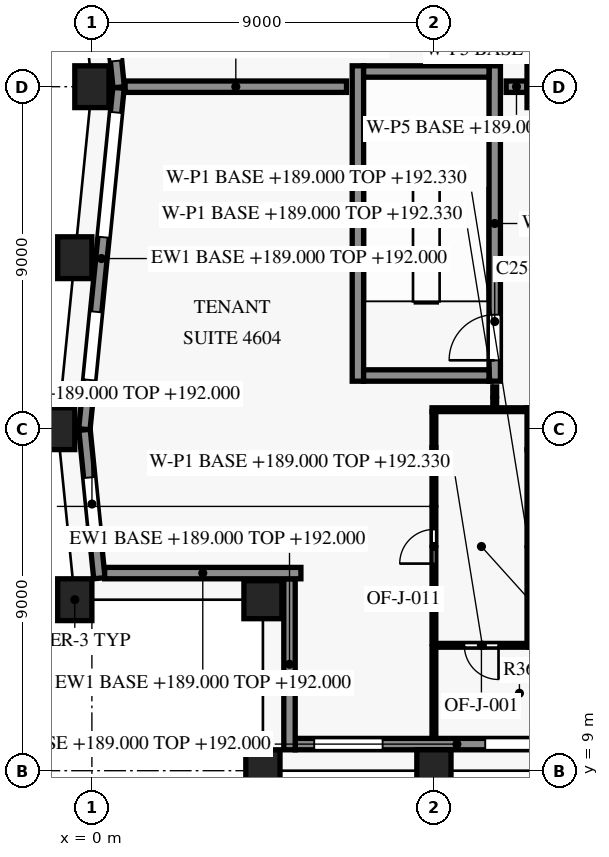
"""IFC4 building model, lengths in metres.
Left out: names, types, materials, properties, quantities, classifications, styles, units other than length and angle.
Written with IfcOpenShell. Run it as: python <this file> out.ifc"""

import sys

from ifc_helpers import new_model, si_unit, direction, frame, frame_2d, origin, origin_2d, place, context, subcontext, project, spatial, rectangle, extrude, element, fill, save


model = new_model("IFC4")
c1 = context("Model", 3, precision=1e-05, world=origin(), true_north=direction((0.0, 1.0)))
c2 = subcontext(c1, "Body", "Model", "MODEL_VIEW")
j1 = project(units=[si_unit("LENGTHUNIT", "METRE"), si_unit("PLANEANGLEUNIT", "RADIAN")], contexts=[c1])
p1 = place(None, origin())
s1 = spatial("IfcSite", under=j1, at=p1, CompositionType="ELEMENT")
p2 = place(p1, origin())
s2 = spatial("IfcBuilding", under=s1, at=p2, CompositionType="ELEMENT")
p3 = place(p2, frame((0.0, 0.0, 189.0)))
s3 = spatial("IfcBuildingStorey", under=s2, at=p3, CompositionType="ELEMENT", Elevation=189.0)
for number, where, z_axis, x_axis in (
    (1, (4.5, 9.0, 0.0), (0.0, 0.0, 1.0), (1.0, 0.0, 0.0)),
    (2, (9.0, 9.0, 0.0), (0.0, 0.0, 1.0), (1.0, 0.0, 0.0)),
    (3, (0.0, 27.0, 0.0), (0.0, 0.0, 1.0), (0.0, -1.0, 0.0)),
    (4, (-0.45, 22.5, 0.0), (0.0, 0.0, 1.0), (-0.1, -0.995, 0.0)),
    (5, (-0.9, 18.0, 0.0), (0.0, 0.0, 1.0), (0.0, -1.0, 0.0)),
    (6, (-0.45, 13.5, 0.0), (0.0, 0.0, 1.0), (0.1, -0.995, 0.0)),
):
    element("IfcColumn", number, at=place(p3, frame(where, z_axis=z_axis, x_axis=x_axis)), inside=s3, PredefinedType="COLUMN", context=c2, shape_type="SweptSolid", body=[
        extrude(rectangle(XDim=0.9, YDim=1.1, at=origin_2d()), origin(), (0.0, 0.0, 1.0), 3.8),
    ])
p4 = place(p3, frame((4.5, 13.5, 0.0), z_axis=(0.0, 0.0, 1.0), x_axis=(1.0, 0.0, 0.0)))
e7 = element("IfcColumn", 7, at=p4, inside=s3, PredefinedType="COLUMN", context=c2, shape_type="SweptSolid", body=[
    extrude(rectangle(XDim=1.0, YDim=1.0, at=origin_2d()), origin(), (0.0, 0.0, 1.0), 3.8),
])
for number, where, z_axis, x_axis in (
    (8, (12.0, 18.0, 0.0), (0.0, 0.0, 1.0), (1.0, 0.0, 0.0)),
    (9, (12.0, 27.0, 0.0), (0.0, 0.0, 1.0), (1.0, 0.0, 0.0)),
):
    element("IfcColumn", number, at=place(p3, frame(where, z_axis=z_axis, x_axis=x_axis)), inside=s3, PredefinedType="COLUMN", context=c2, shape_type="SweptSolid", body=[
        extrude(rectangle(XDim=1.1, YDim=1.1, at=origin_2d()), origin(), (0.0, 0.0, 1.0), 3.8),
    ])
p5 = place(p3, frame((13.86, 9.7, 0.0), z_axis=(0.0, 0.0, 1.0), x_axis=(-1.0, 0.0, 0.0)))
e10 = element("IfcWall", 10, at=p5, inside=s3, PredefinedType="SOLIDWALL", context=c2, shape_type="SweptSolid", body=[
    extrude(rectangle(XDim=8.51, YDim=0.3, at=frame_2d((4.255, 0.0))), origin(), (0.0, 0.0, 1.0), 3.0),
])
p6 = place(p5, frame((1.71, 0.0, 0.75)))
e11 = element("IfcOpeningElement", 11, at=p6, cuts=e10, PredefinedType="OPENING", context=c2, shape_type="SweptSolid", body=[
    extrude(rectangle(XDim=1.8, YDim=1.8, at=frame_2d((0.9, 0.9))), frame((0.0, 0.16, 0.0), z_axis=(0.0, -1.0, 0.0), x_axis=(1.0, 0.0, 0.0)), (0.0, 0.0, 1.0), 0.32),
])
p7 = place(p5, frame((6.21, 0.0, 0.75)))
e12 = element("IfcOpeningElement", 12, at=p7, cuts=e10, PredefinedType="OPENING", context=c2, shape_type="SweptSolid", body=[
    extrude(rectangle(XDim=1.8, YDim=1.8, at=frame_2d((0.9, 0.9))), frame((0.0, 0.16, 0.0), z_axis=(0.0, -1.0, 0.0), x_axis=(1.0, 0.0, 0.0)), (0.0, 0.0, 1.0), 0.32),
])
p8 = place(p3, frame((0.705, 26.985, 0.0), z_axis=(0.0, 0.0, 1.0), x_axis=(-0.099533329093, 0.995034228758, 0.0)))
e13 = element("IfcWall", 13, at=p8, inside=s3, PredefinedType="SOLIDWALL", context=c2, shape_type="SweptSolid", body=[
    extrude(rectangle(XDim=8.98, YDim=0.3, at=frame_2d((4.49, 0.0))), origin(), (0.0, 0.0, 1.0), 3.0),
])
p9 = place(p8, frame((0.696, 0.0, 0.15)))
e14 = element("IfcOpeningElement", 14, at=p9, cuts=e13, PredefinedType="OPENING", context=c2, shape_type="SweptSolid", body=[
    extrude(rectangle(XDim=3.3, YDim=2.4, at=frame_2d((1.65, 1.2))), frame((0.0, 0.16, 0.0), z_axis=(0.0, -1.0, 0.0), x_axis=(1.0, 0.0, 0.0)), (0.0, 0.0, 1.0), 0.32),
])
p10 = place(p8, frame((5.969, 0.0, 0.75)))
e15 = element("IfcOpeningElement", 15, at=p10, cuts=e13, PredefinedType="OPENING", context=c2, shape_type="SweptSolid", body=[
    extrude(rectangle(XDim=1.8, YDim=1.8, at=frame_2d((0.9, 0.9))), frame((0.0, 0.16, 0.0), z_axis=(0.0, -1.0, 0.0), x_axis=(1.0, 0.0, 0.0)), (0.0, 0.0, 1.0), 0.32),
])
p11 = place(p3, frame((-0.198, 17.985, 0.0), z_axis=(0.0, 0.0, 1.0), x_axis=(0.099495688264, 0.995037993253, 0.0)))
e16 = element("IfcWall", 16, at=p11, inside=s3, PredefinedType="SOLIDWALL", context=c2, shape_type="SweptSolid", body=[
    extrude(rectangle(XDim=9.03, YDim=0.3, at=frame_2d((4.515, 0.0))), origin(), (0.0, 0.0, 1.0), 3.0),
])
p12 = place(p11, frame((1.306, 0.0, 0.75)))
e17 = element("IfcOpeningElement", 17, at=p12, cuts=e16, PredefinedType="OPENING", context=c2, shape_type="SweptSolid", body=[
    extrude(rectangle(XDim=1.8, YDim=1.8, at=frame_2d((0.9, 0.9))), frame((0.0, 0.16, 0.0), z_axis=(0.0, -1.0, 0.0), x_axis=(1.0, 0.0, 0.0)), (0.0, 0.0, 1.0), 0.32),
])
p13 = place(p11, frame((5.079, 0.0, 0.15)))
e18 = element("IfcOpeningElement", 18, at=p13, cuts=e16, PredefinedType="OPENING", context=c2, shape_type="SweptSolid", body=[
    extrude(rectangle(XDim=3.3, YDim=2.4, at=frame_2d((1.65, 1.2))), frame((0.0, 0.16, 0.0), z_axis=(0.0, -1.0, 0.0), x_axis=(1.0, 0.0, 0.0)), (0.0, 0.0, 1.0), 0.32),
])
p14 = place(p3, frame((0.197, 14.065, 0.0), z_axis=(0.0, 0.0, 1.0), x_axis=(-0.099528354722, 0.995034726332, 0.0)))
e19 = element("IfcWall", 19, at=p14, inside=s3, PredefinedType="SOLIDWALL", context=c2, shape_type="SweptSolid", body=[
    extrude(rectangle(XDim=3.925, YDim=0.3, at=frame_2d((1.962, 0.0))), origin(), (0.0, 0.0, 1.0), 3.0),
])
p15 = place(p14, frame((0.864, 0.0, 0.75)))
e20 = element("IfcOpeningElement", 20, at=p15, cuts=e19, PredefinedType="OPENING", context=c2, shape_type="SweptSolid", body=[
    extrude(rectangle(XDim=1.8, YDim=1.8, at=frame_2d((0.9, 0.9))), frame((0.0, 0.16, 0.0), z_axis=(0.0, -1.0, 0.0), x_axis=(1.0, 0.0, 0.0)), (0.0, 0.0, 1.0), 0.32),
])
p16 = place(p3, frame((5.5, 14.2, 0.0), z_axis=(0.0, 0.0, 1.0), x_axis=(-1.0, 0.0, 0.0)))
e21 = element("IfcWall", 21, at=p16, inside=s3, PredefinedType="SOLIDWALL", context=c2, shape_type="SweptSolid", body=[
    extrude(rectangle(XDim=5.165, YDim=0.3, at=frame_2d((2.582, 0.0))), origin(), (0.0, 0.0, 1.0), 3.0),
])
p17 = place(p3, frame((5.2, 9.55, 0.0), z_axis=(0.0, 0.0, 1.0), x_axis=(0.0, 1.0, 0.0)))
e22 = element("IfcWall", 22, at=p17, inside=s3, PredefinedType="SOLIDWALL", context=c2, shape_type="SweptSolid", body=[
    extrude(rectangle(XDim=4.502, YDim=0.3, at=frame_2d((2.251, 0.0))), origin(), (0.0, 0.0, 1.0), 3.0),
])
for number, where, z_axis, x_axis in (
    (23, (7.15, 19.4, 0.0), (0.0, 0.0, 1.0), (1.0, 0.0, 0.0)),
    (24, (7.15, 27.4, 0.0), (0.0, 0.0, 1.0), (1.0, 0.0, 0.0)),
):
    element("IfcWall", number, at=place(p3, frame(where, z_axis=z_axis, x_axis=x_axis)), inside=s3, PredefinedType="SHEAR", context=c2, shape_type="SweptSolid", body=[
        extrude(rectangle(XDim=3.3, YDim=0.3, at=frame_2d((1.65, 0.0))), origin(), (0.0, 0.0, 1.0), 3.5),
    ])
p18 = place(p3, frame((7.0, 19.25, 0.0), z_axis=(0.0, 0.0, 1.0), x_axis=(0.0, 1.0, 0.0)))
e25 = element("IfcWall", 25, at=p18, inside=s3, PredefinedType="SHEAR", context=c2, shape_type="SweptSolid", body=[
    extrude(rectangle(XDim=8.3, YDim=0.3, at=frame_2d((4.15, 0.0))), origin(), (0.0, 0.0, 1.0), 3.5),
])
p19 = place(p3, frame((10.6, 19.25, 0.0), z_axis=(0.0, 0.0, 1.0), x_axis=(0.0, 1.0, 0.0)))
e26 = element("IfcWall", 26, at=p19, inside=s3, PredefinedType="SHEAR", context=c2, shape_type="SweptSolid", body=[
    extrude(rectangle(XDim=8.3, YDim=0.3, at=frame_2d((4.15, 0.0))), origin(), (0.0, 0.0, 1.0), 3.5),
])
p20 = place(p19, frame((0.55, 0.0, 0.0)))
e27 = element("IfcOpeningElement", 27, at=p20, cuts=e26, PredefinedType="OPENING", context=c2, shape_type="SweptSolid", body=[
    extrude(rectangle(XDim=1.2, YDim=2.2, at=frame_2d((0.6, 1.1))), frame((0.0, 0.16, 0.0), z_axis=(0.0, -1.0, 0.0), x_axis=(1.0, 0.0, 0.0)), (0.0, 0.0, 1.0), 0.32),
])
p21 = place(p3, frame((9.0, 9.87, 0.0), z_axis=(0.0, 0.0, 1.0), x_axis=(0.0, 1.0, 0.0)))
e28 = element("IfcWall", 28, at=p21, inside=s3, PredefinedType="PARTITIONING", context=c2, shape_type="SweptSolid", body=[
    extrude(rectangle(XDim=2.38, YDim=0.1, at=frame_2d((1.19, 0.0))), origin(), (0.0, 0.0, 1.0), 3.33),
])
p22 = place(p3, frame((11.5, 12.3, 0.0), z_axis=(0.0, 0.0, 1.0), x_axis=(-1.0, 0.0, 0.0)))
e29 = element("IfcWall", 29, at=p22, inside=s3, PredefinedType="PARTITIONING", context=c2, shape_type="SweptSolid", body=[
    extrude(rectangle(XDim=2.45, YDim=0.1, at=frame_2d((1.225, 0.0))), origin(), (0.0, 0.0, 1.0), 3.33),
])
p23 = place(p22, frame((0.8, 0.0, 0.0)))
e30 = element("IfcOpeningElement", 30, at=p23, cuts=e29, PredefinedType="OPENING", context=c2, shape_type="SweptSolid", body=[
    extrude(rectangle(XDim=0.9, YDim=2.1, at=frame_2d((0.45, 1.05))), frame((0.0, 0.06, 0.0), z_axis=(0.0, -1.0, 0.0), x_axis=(1.0, 0.0, 0.0)), (0.0, 0.0, 1.0), 0.12),
])
p24 = place(p3, frame((11.5, 12.3, 0.0), z_axis=(0.0, 0.0, 1.0), x_axis=(1.0, 0.0, 0.0)))
e31 = element("IfcWall", 31, at=p24, inside=s3, PredefinedType="PARTITIONING", context=c2, shape_type="SweptSolid", body=[
    extrude(rectangle(XDim=2.05, YDim=0.1, at=frame_2d((1.025, 0.0))), origin(), (0.0, 0.0, 1.0), 2.63),
])
p25 = place(p3, frame((9.0, 12.35, 0.0), z_axis=(0.0, 0.0, 1.0), x_axis=(0.0, 1.0, 0.0)))
e32 = element("IfcWall", 32, at=p25, inside=s3, PredefinedType="PARTITIONING", context=c2, shape_type="SweptSolid", body=[
    extrude(rectangle(XDim=5.15, YDim=0.1, at=frame_2d((2.575, 0.0))), origin(), (0.0, 0.0, 1.0), 3.33),
])
p26 = place(p25, frame((2.1, 0.0, 0.0)))
e33 = element("IfcOpeningElement", 33, at=p26, cuts=e32, PredefinedType="OPENING", context=c2, shape_type="SweptSolid", body=[
    extrude(rectangle(XDim=0.9, YDim=2.1, at=frame_2d((0.45, 1.05))), frame((0.0, 0.06, 0.0), z_axis=(0.0, -1.0, 0.0), x_axis=(1.0, 0.0, 0.0)), (0.0, 0.0, 1.0), 0.12),
])
p27 = place(p3, frame((11.5, 17.445, 0.0), z_axis=(0.0, 0.0, 1.0), x_axis=(0.0, -1.0, 0.0)))
e34 = element("IfcWall", 34, at=p27, inside=s3, PredefinedType="PARTITIONING", context=c2, shape_type="SweptSolid", body=[
    extrude(rectangle(XDim=5.095, YDim=0.1, at=frame_2d((2.547, 0.0))), origin(), (0.0, 0.0, 1.0), 3.33),
])
p28 = place(p3, frame((9.0, 17.5, 0.0), z_axis=(0.0, 0.0, 1.0), x_axis=(0.0, 1.0, 0.0)))
e35 = element("IfcWall", 35, at=p28, inside=s3, PredefinedType="PARTITIONING", context=c2, shape_type="SweptSolid", body=[
    extrude(rectangle(XDim=0.95, YDim=0.1, at=frame_2d((0.475, 0.0))), origin(), (0.0, 0.0, 1.0), 2.78),
])
p29 = place(p3, frame((8.95, 18.5, 0.0), z_axis=(0.0, 0.0, 1.0), x_axis=(1.0, 0.0, 0.0)))
e36 = element("IfcWall", 36, at=p29, inside=s3, PredefinedType="PARTITIONING", context=c2, shape_type="SweptSolid", body=[
    extrude(rectangle(XDim=2.48, YDim=0.1, at=frame_2d((1.24, 0.0))), origin(), (0.0, 0.0, 1.0), 3.33),
])
p30 = place(p3, frame((10.6, 18.55, 0.0), z_axis=(0.0, 0.0, 1.0), x_axis=(0.0, 1.0, 0.0)))
e37 = element("IfcWall", 37, at=p30, inside=s3, PredefinedType="PARTITIONING", context=c2, shape_type="SweptSolid", body=[
    extrude(rectangle(XDim=0.55, YDim=0.1, at=frame_2d((0.275, 0.0))), origin(), (0.0, 0.0, 1.0), 3.33),
])
p31 = place(p3, frame((0.874, 27.0, 0.0), z_axis=(0.0, 0.0, 1.0), x_axis=(1.0, 0.0, 0.0)))
e38 = element("IfcWall", 38, at=p31, inside=s3, PredefinedType="PARTITIONING", context=c2, shape_type="SweptSolid", body=[
    extrude(rectangle(XDim=5.826, YDim=0.3, at=frame_2d((2.913, 0.0))), origin(), (0.0, 0.0, 1.0), 2.63),
])
p32 = place(p3, frame((10.9, 27.0, 0.0), z_axis=(0.0, 0.0, 1.0), x_axis=(1.0, 0.0, 0.0)))
e39 = element("IfcWall", 39, at=p32, inside=s3, PredefinedType="PARTITIONING", context=c2, shape_type="SweptSolid", body=[
    extrude(rectangle(XDim=0.545, YDim=0.3, at=frame_2d((0.272, 0.0))), origin(), (0.0, 0.0, 1.0), 3.33),
])
p33 = place(p3, frame((10.748, 33.45, 0.0), z_axis=(0.0, 0.0, 1.0), x_axis=(0.0, -1.0, 0.0)))
e40 = element("IfcWall", 40, at=p33, inside=s3, PredefinedType="PARTITIONING", context=c2, shape_type="SweptSolid", body=[
    extrude(rectangle(XDim=5.75, YDim=0.1, at=frame_2d((2.875, 0.0))), origin(), (0.0, 0.0, 1.0), 3.33),
])
p34 = place(p6, origin())
e41 = element("IfcWindow", 41, at=p34, inside=s3, PartitioningType="SINGLE_PANEL", PredefinedType="WINDOW", context=c2, shape_type="SweptSolid", body=[
    extrude(rectangle(XDim=1.8, YDim=1.8, at=frame_2d((0.9, 0.9))), frame((0.0, 0.03, 0.0), z_axis=(0.0, -1.0, 0.0), x_axis=(1.0, 0.0, 0.0)), (0.0, 0.0, 1.0), 0.06),
])
fill(e11, e41)
p35 = place(p7, origin())
e42 = element("IfcWindow", 42, at=p35, inside=s3, PartitioningType="SINGLE_PANEL", PredefinedType="WINDOW", context=c2, shape_type="SweptSolid", body=[
    extrude(rectangle(XDim=1.8, YDim=1.8, at=frame_2d((0.9, 0.9))), frame((0.0, 0.03, 0.0), z_axis=(0.0, -1.0, 0.0), x_axis=(1.0, 0.0, 0.0)), (0.0, 0.0, 1.0), 0.06),
])
fill(e12, e42)
p36 = place(p9, origin())
e43 = element("IfcWindow", 43, at=p36, inside=s3, PartitioningType="SINGLE_PANEL", PredefinedType="WINDOW", context=c2, shape_type="SweptSolid", body=[
    extrude(rectangle(XDim=3.3, YDim=2.4, at=frame_2d((1.65, 1.2))), frame((0.0, 0.03, 0.0), z_axis=(0.0, -1.0, 0.0), x_axis=(1.0, 0.0, 0.0)), (0.0, 0.0, 1.0), 0.06),
])
fill(e14, e43)
p37 = place(p12, origin())
e44 = element("IfcWindow", 44, at=p37, inside=s3, PartitioningType="SINGLE_PANEL", PredefinedType="WINDOW", context=c2, shape_type="SweptSolid", body=[
    extrude(rectangle(XDim=1.8, YDim=1.8, at=frame_2d((0.9, 0.9))), frame((0.0, 0.03, 0.0), z_axis=(0.0, -1.0, 0.0), x_axis=(1.0, 0.0, 0.0)), (0.0, 0.0, 1.0), 0.06),
])
fill(e17, e44)
p38 = place(p13, origin())
e45 = element("IfcWindow", 45, at=p38, inside=s3, PartitioningType="SINGLE_PANEL", PredefinedType="WINDOW", context=c2, shape_type="SweptSolid", body=[
    extrude(rectangle(XDim=3.3, YDim=2.4, at=frame_2d((1.65, 1.2))), frame((0.0, 0.03, 0.0), z_axis=(0.0, -1.0, 0.0), x_axis=(1.0, 0.0, 0.0)), (0.0, 0.0, 1.0), 0.06),
])
fill(e18, e45)
p39 = place(p15, origin())
e46 = element("IfcWindow", 46, at=p39, inside=s3, PartitioningType="SINGLE_PANEL", PredefinedType="WINDOW", context=c2, shape_type="SweptSolid", body=[
    extrude(rectangle(XDim=1.8, YDim=1.8, at=frame_2d((0.9, 0.9))), frame((0.0, 0.03, 0.0), z_axis=(0.0, -1.0, 0.0), x_axis=(1.0, 0.0, 0.0)), (0.0, 0.0, 1.0), 0.06),
])
fill(e20, e46)
p40 = place(p20, origin())
e47 = element("IfcDoor", 47, at=p40, inside=s3, OperationType="SINGLE_SWING_RIGHT", PredefinedType="DOOR", context=c2, shape_type="SweptSolid", body=[
    extrude(rectangle(XDim=1.2, YDim=2.2, at=frame_2d((0.6, 1.1))), frame((0.0, 0.025, 0.0), z_axis=(0.0, -1.0, 0.0), x_axis=(1.0, 0.0, 0.0)), (0.0, 0.0, 1.0), 0.05),
])
fill(e27, e47)
p41 = place(p23, origin())
e48 = element("IfcDoor", 48, at=p41, inside=s3, OperationType="SINGLE_SWING_RIGHT", PredefinedType="DOOR", context=c2, shape_type="SweptSolid", body=[
    extrude(rectangle(XDim=0.9, YDim=2.1, at=frame_2d((0.45, 1.05))), frame((0.0, 0.025, 0.0), z_axis=(0.0, -1.0, 0.0), x_axis=(1.0, 0.0, 0.0)), (0.0, 0.0, 1.0), 0.05),
])
fill(e30, e48)
p42 = place(p26, origin())
e49 = element("IfcDoor", 49, at=p42, inside=s3, OperationType="SINGLE_SWING_RIGHT", PredefinedType="DOOR", context=c2, shape_type="SweptSolid", body=[
    extrude(rectangle(XDim=0.9, YDim=2.1, at=frame_2d((0.45, 1.05))), frame((0.0, 0.025, 0.0), z_axis=(0.0, -1.0, 0.0), x_axis=(1.0, 0.0, 0.0)), (0.0, 0.0, 1.0), 0.05),
])
fill(e33, e49)
save(model, sys.argv[1])
